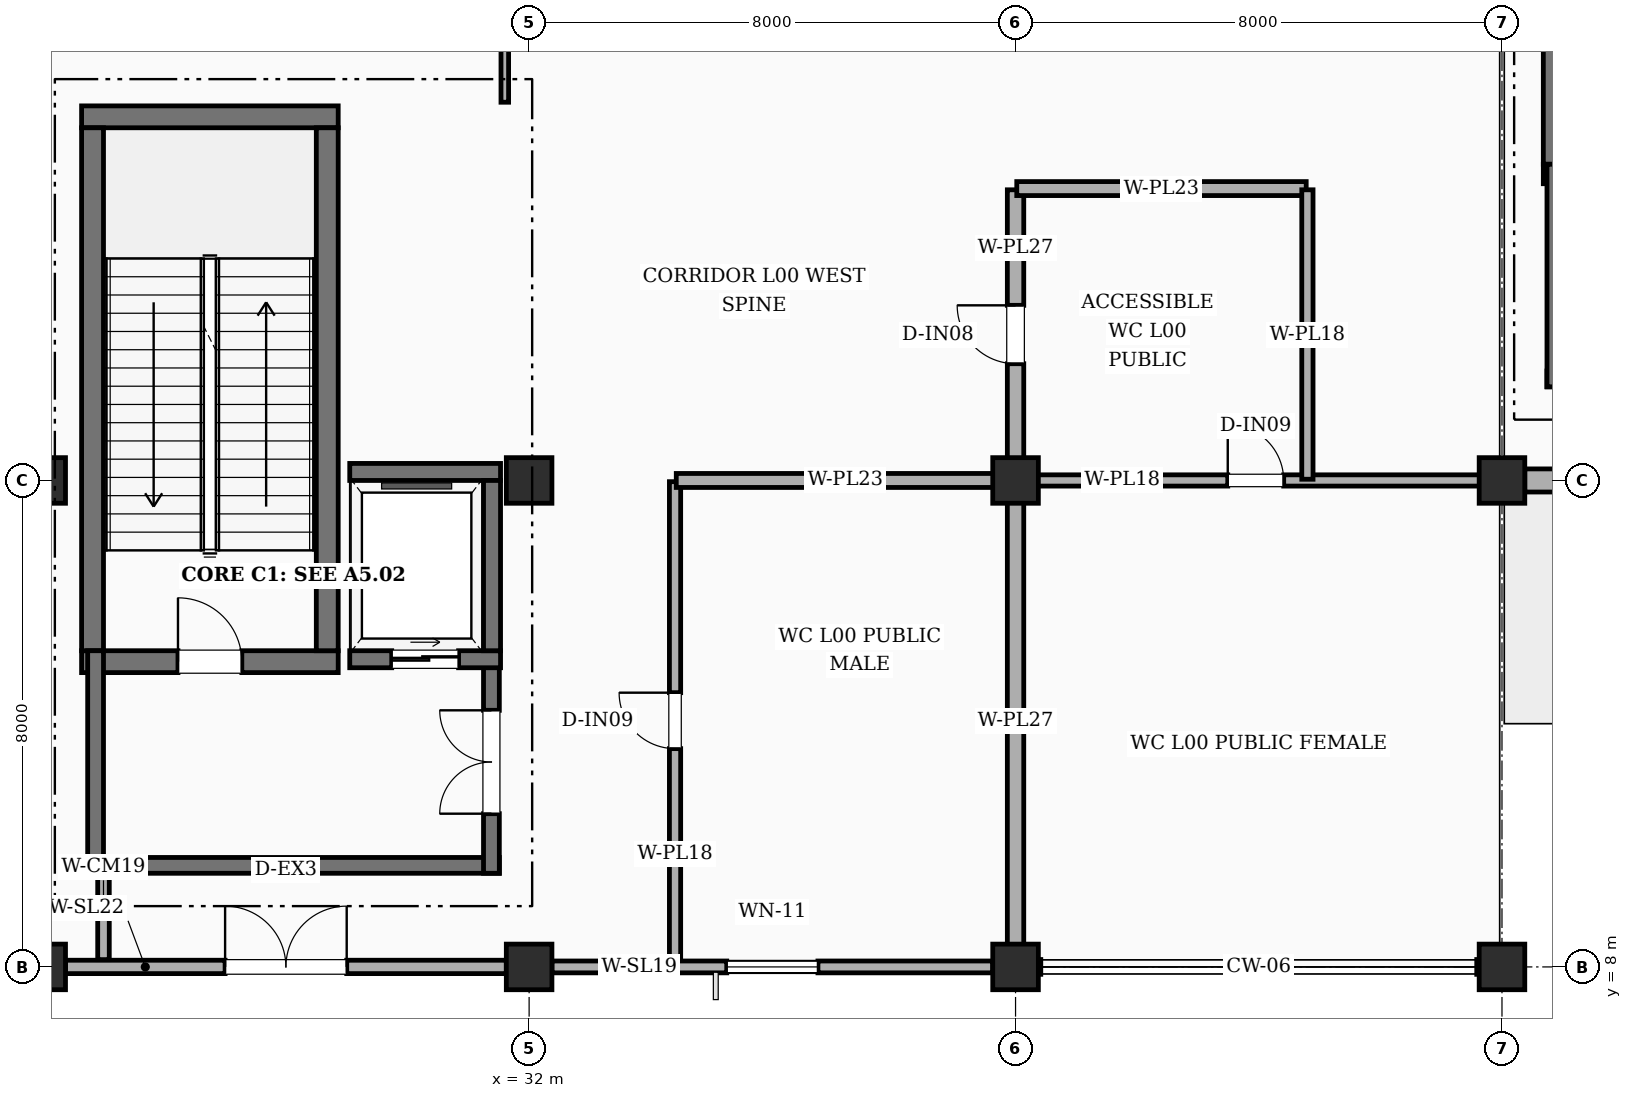
"""IFC4 building model, lengths in metres.
Left out: names, types, materials, properties, quantities, classifications, styles, units other than length and angle.
Written with IfcOpenShell. Run it as: python <this file> out.ifc"""

import sys

from ifc_helpers import new_model, si_unit, direction, frame, frame_2d, origin, origin_2d, place, context, subcontext, project, spatial, rectangle, extrude, element, fill, save


model = new_model("IFC4")
c1 = context("Model", 3, precision=1e-05, world=origin(), true_north=direction((0.0, 1.0)))
c2 = subcontext(c1, "Body", "Model", "MODEL_VIEW")
j1 = project(units=[si_unit("LENGTHUNIT", "METRE"), si_unit("PLANEANGLEUNIT", "RADIAN")], contexts=[c1])
p1 = place(None, origin())
s1 = spatial("IfcSite", under=j1, at=p1, CompositionType="ELEMENT")
p2 = place(p1, origin())
s2 = spatial("IfcBuilding", under=s1, at=p2, CompositionType="ELEMENT")
p3 = place(p2, origin())
s3 = spatial("IfcBuildingStorey", under=s2, at=p3, CompositionType="ELEMENT", Elevation=0.0)
for number, where, z_axis, x_axis in (
    (1, (24.0, 8.0, 0.0), (0.0, 0.0, 1.0), (1.0, 0.0, 0.0)),
    (2, (24.0, 16.0, 0.0), (0.0, 0.0, 1.0), (1.0, 0.0, 0.0)),
    (3, (32.0, 8.0, 0.0), (0.0, 0.0, 1.0), (1.0, 0.0, 0.0)),
    (4, (32.0, 16.0, 0.0), (0.0, 0.0, 1.0), (1.0, 0.0, 0.0)),
    (5, (40.0, 8.0, 0.0), (0.0, 0.0, 1.0), (1.0, 0.0, 0.0)),
    (6, (40.0, 16.0, 0.0), (0.0, 0.0, 1.0), (1.0, 0.0, 0.0)),
    (7, (48.0, 8.0, 0.0), (0.0, 0.0, 1.0), (1.0, 0.0, 0.0)),
    (8, (48.0, 16.0, 0.0), (0.0, 0.0, 1.0), (1.0, 0.0, 0.0)),
):
    element("IfcColumn", number, at=place(p3, frame(where, z_axis=z_axis, x_axis=x_axis)), inside=s3, PredefinedType="COLUMN", context=c2, shape_type="SweptSolid", body=[
        extrude(rectangle(XDim=0.75, YDim=0.75, at=origin_2d()), origin(), (0.0, 0.0, 1.0), 5.4),
    ])
p4 = place(p3, frame((48.375, 16.0, 0.0), z_axis=(0.0, 0.0, 1.0), x_axis=(1.0, 0.0, 0.0)))
e9 = element("IfcWall", 9, at=p4, inside=s3, PredefinedType="STANDARD", context=c2, shape_type="SweptSolid", body=[
    extrude(rectangle(XDim=7.225, YDim=0.38, at=frame_2d((3.613, 0.0))), origin(), (0.0, 0.0, 1.0), 4.42),
])
p5 = place(p4, frame((2.613, 0.0, 0.0)))
e10 = element("IfcOpeningElement", 10, at=p5, cuts=e9, PredefinedType="OPENING", context=c2, shape_type="SweptSolid", body=[
    extrude(rectangle(XDim=2.0, YDim=2.4, at=frame_2d((1.0, 1.2))), frame((0.0, 0.2, 0.0), z_axis=(0.0, -1.0, 0.0), x_axis=(1.0, 0.0, 0.0)), (0.0, 0.0, 1.0), 0.4),
])
p6 = place(p3, frame((24.375, 8.0, 0.0), z_axis=(0.0, 0.0, 1.0), x_axis=(1.0, 0.0, 0.0)))
e11 = element("IfcWall", 11, at=p6, inside=s3, PredefinedType="SOLIDWALL", context=c2, shape_type="SweptSolid", body=[
    extrude(rectangle(XDim=7.25, YDim=0.22, at=frame_2d((3.625, 0.0))), origin(), (0.0, 0.0, 1.0), 4.42),
])
p7 = place(p6, frame((2.625, 0.0, 0.0)))
e12 = element("IfcOpeningElement", 12, at=p7, cuts=e11, PredefinedType="OPENING", context=c2, shape_type="SweptSolid", body=[
    extrude(rectangle(XDim=2.0, YDim=2.4, at=frame_2d((1.0, 1.2))), frame((0.0, 0.12, 0.0), z_axis=(0.0, -1.0, 0.0), x_axis=(1.0, 0.0, 0.0)), (0.0, 0.0, 1.0), 0.24),
])
p8 = place(p3, frame((32.375, 8.0, 0.0), z_axis=(0.0, 0.0, 1.0), x_axis=(1.0, 0.0, 0.0)))
e13 = element("IfcWall", 13, at=p8, inside=s3, PredefinedType="SOLIDWALL", context=c2, shape_type="SweptSolid", body=[
    extrude(rectangle(XDim=7.25, YDim=0.195, at=frame_2d((3.625, 0.0))), origin(), (0.0, 0.0, 1.0), 4.42),
])
p9 = place(p8, frame((2.875, 0.0, 0.95)))
e14 = element("IfcOpeningElement", 14, at=p9, cuts=e13, PredefinedType="OPENING", context=c2, shape_type="SweptSolid", body=[
    extrude(rectangle(XDim=1.5, YDim=1.8, at=frame_2d((0.75, 0.9))), frame((0.0, 0.107, 0.0), z_axis=(0.0, -1.0, 0.0), x_axis=(1.0, 0.0, 0.0)), (0.0, 0.0, 1.0), 0.215),
])
p10 = place(p3, frame((24.64, 13.02, 0.0), z_axis=(0.0, 0.0, 1.0), x_axis=(1.0, 0.0, 0.0)))
e15 = element("IfcWall", 15, at=p10, inside=s3, PredefinedType="SHEAR", context=c2, shape_type="SweptSolid", body=[
    extrude(rectangle(XDim=4.22, YDim=0.36, at=frame_2d((2.11, 0.0))), origin(), (0.0, 0.0, 1.0), 5.4),
])
p11 = place(p10, frame((1.585, 0.0, 0.0)))
e16 = element("IfcOpeningElement", 16, at=p11, cuts=e15, PredefinedType="OPENING", context=c2, shape_type="SweptSolid", body=[
    extrude(rectangle(XDim=1.05, YDim=2.15, at=frame_2d((0.525, 1.075))), frame((0.0, 0.19, 0.0), z_axis=(0.0, -1.0, 0.0), x_axis=(1.0, 0.0, 0.0)), (0.0, 0.0, 1.0), 0.38),
])
p12 = place(p3, frame((24.64, 21.98, 0.0), z_axis=(0.0, 0.0, 1.0), x_axis=(1.0, 0.0, 0.0)))
e17 = element("IfcWall", 17, at=p12, inside=s3, PredefinedType="SHEAR", context=c2, shape_type="SweptSolid", body=[
    extrude(rectangle(XDim=4.22, YDim=0.36, at=frame_2d((2.11, 0.0))), origin(), (0.0, 0.0, 1.0), 5.4),
])
for number, where, z_axis, x_axis in (
    (18, (24.82, 13.2, 0.0), (0.0, 0.0, 1.0), (0.0, 1.0, 0.0)),
    (19, (28.68, 13.2, 0.0), (0.0, 0.0, 1.0), (0.0, 1.0, 0.0)),
):
    element("IfcWall", number, at=place(p3, frame(where, z_axis=z_axis, x_axis=x_axis)), inside=s3, PredefinedType="SHEAR", context=c2, shape_type="SweptSolid", body=[
        extrude(rectangle(XDim=8.6, YDim=0.36, at=frame_2d((4.3, 0.0))), origin(), (0.0, 0.0, 1.0), 5.4),
    ])
p13 = place(p3, frame((31.51, 9.67, 0.0), z_axis=(0.0, 0.0, 1.0), x_axis=(-1.0, 0.0, 0.0)))
e20 = element("IfcWall", 20, at=p13, inside=s3, PredefinedType="SHEAR", context=c2, shape_type="SweptSolid", body=[
    extrude(rectangle(XDim=6.77, YDim=0.26, at=frame_2d((3.385, 0.0))), origin(), (0.0, 0.0, 1.0), 5.4),
])
p14 = place(p3, frame((24.87, 9.54, 0.0), z_axis=(0.0, 0.0, 1.0), x_axis=(0.0, 1.0, 0.0)))
e21 = element("IfcWall", 21, at=p14, inside=s3, PredefinedType="SHEAR", context=c2, shape_type="SweptSolid", body=[
    extrude(rectangle(XDim=3.66, YDim=0.26, at=frame_2d((1.83, 0.0))), origin(), (0.0, 0.0, 1.0), 5.4),
])
p15 = place(p3, frame((31.38, 9.54, 0.0), z_axis=(0.0, 0.0, 1.0), x_axis=(0.0, 1.0, 0.0)))
e22 = element("IfcWall", 22, at=p15, inside=s3, PredefinedType="SHEAR", context=c2, shape_type="SweptSolid", body=[
    extrude(rectangle(XDim=3.66, YDim=0.26, at=frame_2d((1.83, 0.0))), origin(), (0.0, 0.0, 1.0), 5.4),
])
p16 = place(p15, frame((0.98, 0.0, 0.0)))
e23 = element("IfcOpeningElement", 23, at=p16, cuts=e22, PredefinedType="OPENING", context=c2, shape_type="SweptSolid", body=[
    extrude(rectangle(XDim=1.7, YDim=2.2, at=frame_2d((0.85, 1.1))), frame((0.0, 0.14, 0.0), z_axis=(0.0, -1.0, 0.0), x_axis=(1.0, 0.0, 0.0)), (0.0, 0.0, 1.0), 0.28),
])
p17 = place(p3, frame((29.05, 13.06, 0.0), z_axis=(0.0, 0.0, 1.0), x_axis=(1.0, 0.0, 0.0)))
e24 = element("IfcWall", 24, at=p17, inside=s3, PredefinedType="SHEAR", context=c2, shape_type="SweptSolid", body=[
    extrude(rectangle(XDim=2.48, YDim=0.28, at=frame_2d((1.24, 0.0))), origin(), (0.0, 0.0, 1.0), 5.4),
])
p18 = place(p17, frame((0.69, 0.0, 0.0)))
e25 = element("IfcOpeningElement", 25, at=p18, cuts=e24, PredefinedType="OPENING", context=c2, shape_type="SweptSolid", body=[
    extrude(rectangle(XDim=1.1, YDim=2.15, at=frame_2d((0.55, 1.075))), frame((0.0, 0.15, 0.0), z_axis=(0.0, -1.0, 0.0), x_axis=(1.0, 0.0, 0.0)), (0.0, 0.0, 1.0), 0.3),
])
p19 = place(p3, frame((29.05, 16.14, 0.0), z_axis=(0.0, 0.0, 1.0), x_axis=(1.0, 0.0, 0.0)))
e26 = element("IfcWall", 26, at=p19, inside=s3, PredefinedType="SHEAR", context=c2, shape_type="SweptSolid", body=[
    extrude(rectangle(XDim=2.48, YDim=0.28, at=frame_2d((1.24, 0.0))), origin(), (0.0, 0.0, 1.0), 5.4),
])
p20 = place(p3, frame((31.39, 13.2, 0.0), z_axis=(0.0, 0.0, 1.0), x_axis=(0.0, 1.0, 0.0)))
e27 = element("IfcWall", 27, at=p20, inside=s3, PredefinedType="SHEAR", context=c2, shape_type="SweptSolid", body=[
    extrude(rectangle(XDim=2.8, YDim=0.28, at=frame_2d((1.4, 0.0))), origin(), (0.0, 0.0, 1.0), 5.4),
])
p21 = place(p3, frame((48.68, 21.04, 0.0), z_axis=(0.0, 0.0, 1.0), x_axis=(1.0, 0.0, 0.0)))
e28 = element("IfcWall", 28, at=p21, inside=s3, PredefinedType="SHEAR", context=c2, shape_type="SweptSolid", body=[
    extrude(rectangle(XDim=4.24, YDim=0.32, at=frame_2d((2.12, 0.0))), origin(), (0.0, 0.0, 1.0), 5.4),
])
p22 = place(p21, frame((1.595, 0.0, 0.0)))
e29 = element("IfcOpeningElement", 29, at=p22, cuts=e28, PredefinedType="OPENING", context=c2, shape_type="SweptSolid", body=[
    extrude(rectangle(XDim=1.05, YDim=2.15, at=frame_2d((0.525, 1.075))), frame((0.0, 0.17, 0.0), z_axis=(0.0, -1.0, 0.0), x_axis=(1.0, 0.0, 0.0)), (0.0, 0.0, 1.0), 0.34),
])
p23 = place(p3, frame((48.84, 21.2, 0.0), z_axis=(0.0, 0.0, 1.0), x_axis=(0.0, 1.0, 0.0)))
e30 = element("IfcWall", 30, at=p23, inside=s3, PredefinedType="SHEAR", context=c2, shape_type="SweptSolid", body=[
    extrude(rectangle(XDim=8.6, YDim=0.32, at=frame_2d((4.3, 0.0))), origin(), (0.0, 0.0, 1.0), 5.4),
])
p24 = place(p3, frame((55.56, 17.67, 0.0), z_axis=(0.0, 0.0, 1.0), x_axis=(-1.0, 0.0, 0.0)))
e31 = element("IfcWall", 31, at=p24, inside=s3, PredefinedType="SHEAR", context=c2, shape_type="SweptSolid", body=[
    extrude(rectangle(XDim=6.82, YDim=0.26, at=frame_2d((3.41, 0.0))), origin(), (0.0, 0.0, 1.0), 5.4),
])
p25 = place(p3, frame((48.87, 17.54, 0.0), z_axis=(0.0, 0.0, 1.0), x_axis=(0.0, 1.0, 0.0)))
e32 = element("IfcWall", 32, at=p25, inside=s3, PredefinedType="SHEAR", context=c2, shape_type="SweptSolid", body=[
    extrude(rectangle(XDim=3.66, YDim=0.26, at=frame_2d((1.83, 0.0))), origin(), (0.0, 0.0, 1.0), 5.4),
])
p26 = place(p3, frame((31.6, 22.22, 0.0), z_axis=(0.0, 0.0, 1.0), x_axis=(0.0, 1.0, 0.0)))
e33 = element("IfcWall", 33, at=p26, inside=s3, PredefinedType="PARTITIONING", context=c2, shape_type="SweptSolid", body=[
    extrude(rectangle(XDim=21.76, YDim=0.125, at=frame_2d((10.88, 0.0))), origin(), (0.0, 0.0, 1.0), 4.27),
])
p27 = place(p26, frame((12.344, 0.0, 0.0)))
e34 = element("IfcOpeningElement", 34, at=p27, cuts=e33, PredefinedType="OPENING", context=c2, shape_type="SweptSolid", body=[
    extrude(rectangle(XDim=1.85, YDim=2.3, at=frame_2d((0.925, 1.15))), frame((0.0, 0.073, 0.0), z_axis=(0.0, -1.0, 0.0), x_axis=(1.0, 0.0, 0.0)), (0.0, 0.0, 1.0), 0.145),
])
p28 = place(p3, frame((25.0, 8.12, 0.0), z_axis=(0.0, 0.0, 1.0), x_axis=(0.0, 1.0, 0.0)))
e35 = element("IfcWall", 35, at=p28, inside=s3, PredefinedType="SOLIDWALL", context=c2, shape_type="SweptSolid", body=[
    extrude(rectangle(XDim=1.66, YDim=0.19, at=frame_2d((0.83, 0.0))), origin(), (0.0, 0.0, 1.0), 4.42),
])
p29 = place(p3, frame((34.4, 8.12, 0.0), z_axis=(0.0, 0.0, 1.0), x_axis=(0.0, 1.0, 0.0)))
e36 = element("IfcWall", 36, at=p29, inside=s3, PredefinedType="PLUMBINGWALL", context=c2, shape_type="SweptSolid", body=[
    extrude(rectangle(XDim=7.86, YDim=0.185, at=frame_2d((3.93, 0.0))), origin(), (0.0, 0.0, 1.0), 4.27),
])
p30 = place(p29, frame((3.47, 0.0, 0.0)))
e37 = element("IfcOpeningElement", 37, at=p30, cuts=e36, PredefinedType="OPENING", context=c2, shape_type="SweptSolid", body=[
    extrude(rectangle(XDim=0.92, YDim=2.1, at=frame_2d((0.46, 1.05))), frame((0.0, 0.103, 0.0), z_axis=(0.0, -1.0, 0.0), x_axis=(1.0, 0.0, 0.0)), (0.0, 0.0, 1.0), 0.205),
])
p31 = place(p3, frame((40.0, 8.12, 0.0), z_axis=(0.0, 0.0, 1.0), x_axis=(0.0, 1.0, 0.0)))
e38 = element("IfcWall", 38, at=p31, inside=s3, PredefinedType="PLUMBINGWALL", context=c2, shape_type="SweptSolid", body=[
    extrude(rectangle(XDim=7.86, YDim=0.27, at=frame_2d((3.93, 0.0))), origin(), (0.0, 0.0, 1.0), 4.27),
])
p32 = place(p3, frame((34.42, 16.0, 0.0), z_axis=(0.0, 0.0, 1.0), x_axis=(1.0, 0.0, 0.0)))
e39 = element("IfcWall", 39, at=p32, inside=s3, PredefinedType="PLUMBINGWALL", context=c2, shape_type="SweptSolid", body=[
    extrude(rectangle(XDim=5.56, YDim=0.23, at=frame_2d((2.78, 0.0))), origin(), (0.0, 0.0, 1.0), 4.27),
])
p33 = place(p3, frame((40.02, 16.0, 0.0), z_axis=(0.0, 0.0, 1.0), x_axis=(1.0, 0.0, 0.0)))
e40 = element("IfcWall", 40, at=p33, inside=s3, PredefinedType="PLUMBINGWALL", context=c2, shape_type="SweptSolid", body=[
    extrude(rectangle(XDim=7.86, YDim=0.185, at=frame_2d((3.93, 0.0))), origin(), (0.0, 0.0, 1.0), 4.27),
])
p34 = place(p33, frame((3.47, 0.0, 0.0)))
e41 = element("IfcOpeningElement", 41, at=p34, cuts=e40, PredefinedType="OPENING", context=c2, shape_type="SweptSolid", body=[
    extrude(rectangle(XDim=0.92, YDim=2.1, at=frame_2d((0.46, 1.05))), frame((0.0, 0.103, 0.0), z_axis=(0.0, -1.0, 0.0), x_axis=(1.0, 0.0, 0.0)), (0.0, 0.0, 1.0), 0.205),
])
p35 = place(p3, frame((40.0, 16.02, 0.0), z_axis=(0.0, 0.0, 1.0), x_axis=(0.0, 1.0, 0.0)))
e42 = element("IfcWall", 42, at=p35, inside=s3, PredefinedType="PLUMBINGWALL", context=c2, shape_type="SweptSolid", body=[
    extrude(rectangle(XDim=4.76, YDim=0.27, at=frame_2d((2.38, 0.0))), origin(), (0.0, 0.0, 1.0), 4.27),
])
p36 = place(p35, frame((1.9, 0.0, 0.0)))
e43 = element("IfcOpeningElement", 43, at=p36, cuts=e42, PredefinedType="OPENING", context=c2, shape_type="SweptSolid", body=[
    extrude(rectangle(XDim=0.96, YDim=2.1, at=frame_2d((0.48, 1.05))), frame((0.0, 0.145, 0.0), z_axis=(0.0, -1.0, 0.0), x_axis=(1.0, 0.0, 0.0)), (0.0, 0.0, 1.0), 0.29),
])
p37 = place(p3, frame((40.02, 20.8, 0.0), z_axis=(0.0, 0.0, 1.0), x_axis=(1.0, 0.0, 0.0)))
e44 = element("IfcWall", 44, at=p37, inside=s3, PredefinedType="PLUMBINGWALL", context=c2, shape_type="SweptSolid", body=[
    extrude(rectangle(XDim=4.76, YDim=0.23, at=frame_2d((2.38, 0.0))), origin(), (0.0, 0.0, 1.0), 4.27),
])
p38 = place(p3, frame((44.8, 16.02, 0.0), z_axis=(0.0, 0.0, 1.0), x_axis=(0.0, 1.0, 0.0)))
e45 = element("IfcWall", 45, at=p38, inside=s3, PredefinedType="PLUMBINGWALL", context=c2, shape_type="SweptSolid", body=[
    extrude(rectangle(XDim=4.76, YDim=0.185, at=frame_2d((2.38, 0.0))), origin(), (0.0, 0.0, 1.0), 4.27),
])
p39 = place(p7, frame((2.0, 0.0, 0.0), z_axis=(0.0, 0.0, 1.0), x_axis=(-1.0, 0.0, 0.0)))
e46 = element("IfcDoor", 46, at=p39, inside=s3, OperationType="DOUBLE_DOOR_SINGLE_SWING", PredefinedType="DOOR", context=c2, shape_type="SweptSolid", body=[
    extrude(rectangle(XDim=2.0, YDim=2.4, at=frame_2d((-1.0, 1.2))), frame((0.0, -0.025, 0.0), z_axis=(0.0, 1.0, 0.0), x_axis=(-1.0, 0.0, 0.0)), (0.0, 0.0, 1.0), 0.05),
])
fill(e12, e46)
p40 = place(p9, origin())
e47 = element("IfcWindow", 47, at=p40, inside=s3, PartitioningType="SINGLE_PANEL", PredefinedType="WINDOW", context=c2, shape_type="SweptSolid", body=[
    extrude(rectangle(XDim=1.5, YDim=1.8, at=frame_2d((0.75, 0.9))), frame((0.0, 0.03, 0.0), z_axis=(0.0, -1.0, 0.0), x_axis=(1.0, 0.0, 0.0)), (0.0, 0.0, 1.0), 0.06),
])
fill(e14, e47)
p41 = place(p11, origin())
e48 = element("IfcDoor", 48, at=p41, inside=s3, OperationType="SINGLE_SWING_LEFT", PredefinedType="DOOR", context=c2, shape_type="SweptSolid", body=[
    extrude(rectangle(XDim=1.05, YDim=2.15, at=frame_2d((0.525, 1.075))), frame((0.0, 0.025, 0.0), z_axis=(0.0, -1.0, 0.0), x_axis=(1.0, 0.0, 0.0)), (0.0, 0.0, 1.0), 0.05),
])
fill(e16, e48)
p42 = place(p16, origin())
e49 = element("IfcDoor", 49, at=p42, inside=s3, OperationType="DOUBLE_DOOR_SINGLE_SWING", PredefinedType="DOOR", context=c2, shape_type="SweptSolid", body=[
    extrude(rectangle(XDim=1.7, YDim=2.2, at=frame_2d((0.85, 1.1))), frame((0.0, 0.025, 0.0), z_axis=(0.0, -1.0, 0.0), x_axis=(1.0, 0.0, 0.0)), (0.0, 0.0, 1.0), 0.05),
])
fill(e23, e49)
p43 = place(p18, origin())
e50 = element("IfcDoor", 50, at=p43, inside=s3, OperationType="SLIDING_TO_LEFT", PredefinedType="DOOR", context=c2, shape_type="SweptSolid", body=[
    extrude(rectangle(XDim=1.1, YDim=2.15, at=frame_2d((0.55, 1.075))), frame((0.0, 0.025, 0.0), z_axis=(0.0, -1.0, 0.0), x_axis=(1.0, 0.0, 0.0)), (0.0, 0.0, 1.0), 0.05),
])
fill(e25, e50)
p44 = place(p30, origin())
e51 = element("IfcDoor", 51, at=p44, inside=s3, OperationType="SINGLE_SWING_RIGHT", PredefinedType="DOOR", context=c2, shape_type="SweptSolid", body=[
    extrude(rectangle(XDim=0.92, YDim=2.1, at=frame_2d((0.46, 1.05))), frame((0.0, 0.025, 0.0), z_axis=(0.0, -1.0, 0.0), x_axis=(1.0, 0.0, 0.0)), (0.0, 0.0, 1.0), 0.05),
])
fill(e37, e51)
p45 = place(p34, origin())
e52 = element("IfcDoor", 52, at=p45, inside=s3, OperationType="SINGLE_SWING_LEFT", PredefinedType="DOOR", context=c2, shape_type="SweptSolid", body=[
    extrude(rectangle(XDim=0.92, YDim=2.1, at=frame_2d((0.46, 1.05))), frame((0.0, 0.025, 0.0), z_axis=(0.0, -1.0, 0.0), x_axis=(1.0, 0.0, 0.0)), (0.0, 0.0, 1.0), 0.05),
])
fill(e41, e52)
p46 = place(p36, origin())
e53 = element("IfcDoor", 53, at=p46, inside=s3, OperationType="SINGLE_SWING_RIGHT", PredefinedType="DOOR", context=c2, shape_type="SweptSolid", body=[
    extrude(rectangle(XDim=0.96, YDim=2.1, at=frame_2d((0.48, 1.05))), frame((0.0, 0.025, 0.0), z_axis=(0.0, -1.0, 0.0), x_axis=(1.0, 0.0, 0.0)), (0.0, 0.0, 1.0), 0.05),
])
fill(e43, e53)
save(model, sys.argv[1])
